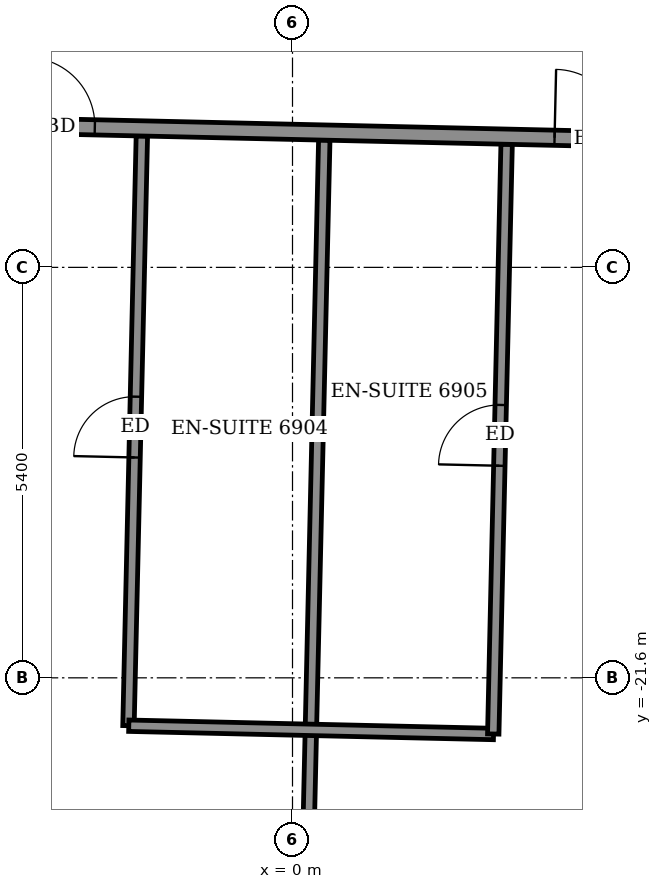
"""IFC4 building model, lengths in metres.
Left out: names, types, materials, properties, quantities, classifications, styles, units other than length and angle.
Written with IfcOpenShell. Run it as: python <this file> out.ifc"""

import sys

from ifc_helpers import new_model, si_unit, direction, frame, frame_2d, origin, place, context, subcontext, project, spatial, rectangle, extrude, element, fill, save


model = new_model("IFC4")
c1 = context("Model", 3, precision=1e-05, world=origin(), true_north=direction((0.0, 1.0)))
c2 = subcontext(c1, "Body", "Model", "MODEL_VIEW")
j1 = project(units=[si_unit("LENGTHUNIT", "METRE"), si_unit("PLANEANGLEUNIT", "RADIAN")], contexts=[c1])
p1 = place(None, origin())
s1 = spatial("IfcSite", under=j1, at=p1, CompositionType="ELEMENT")
p2 = place(p1, origin())
s2 = spatial("IfcBuilding", under=s1, at=p2, CompositionType="ELEMENT")
p3 = place(p2, frame((0.0, 0.0, 271.7)))
s3 = spatial("IfcBuildingStorey", under=s2, at=p3, CompositionType="ELEMENT", Elevation=271.7)
p4 = place(p3, frame((0.143, -26.623, 0.0), z_axis=(0.0, 0.0, 1.0), x_axis=(0.022718655443, 0.999741898039, 0.0)))
e1 = element("IfcWall", 1, at=p4, inside=s3, PredefinedType="PARTITIONING", context=c2, shape_type="SweptSolid", body=[
    extrude(rectangle(XDim=12.1, YDim=0.15, at=frame_2d((6.05, 0.0))), origin(), (0.0, 0.0, 1.0), 2.55),
])
p5 = place(p3, frame((-2.158, -22.23, 0.0), z_axis=(0.0, 0.0, 1.0), x_axis=(0.022683528451, 0.999742695666, 0.0)))
e2 = element("IfcWall", 2, at=p5, inside=s3, PredefinedType="PARTITIONING", context=c2, shape_type="SweptSolid", body=[
    extrude(rectangle(XDim=7.76, YDim=0.15, at=frame_2d((3.88, 0.0))), origin(), (0.0, 0.0, 1.0), 3.05),
])
p6 = place(p5, frame((3.53, 0.0, 0.0)))
e3 = element("IfcOpeningElement", 3, at=p6, cuts=e2, PredefinedType="OPENING", context=c2, shape_type="SweptSolid", body=[
    extrude(rectangle(XDim=0.8, YDim=2.1, at=frame_2d((0.4, 1.05))), frame((0.0, 0.085, 0.0), z_axis=(0.0, -1.0, 0.0), x_axis=(1.0, 0.0, 0.0)), (0.0, 0.0, 1.0), 0.17),
])
p7 = place(p3, frame((-2.154, -22.23, 0.0), z_axis=(0.0, 0.0, 1.0), x_axis=(0.99974154664, -0.022734113616, 0.0)))
e4 = element("IfcWall", 4, at=p7, inside=s3, PredefinedType="PARTITIONING", context=c2, shape_type="SweptSolid", body=[
    extrude(rectangle(XDim=4.8, YDim=0.15, at=frame_2d((2.4, 0.0))), origin(), (0.0, 0.0, 1.0), 3.05),
])
p8 = place(p3, frame((2.641, -22.339, 0.0), z_axis=(0.0, 0.0, 1.0), x_axis=(0.022652083401, 0.999743408639, 0.0)))
e5 = element("IfcWall", 5, at=p8, inside=s3, PredefinedType="PARTITIONING", context=c2, shape_type="SweptSolid", body=[
    extrude(rectangle(XDim=7.76, YDim=0.15, at=frame_2d((3.88, 0.0))), origin(), (0.0, 0.0, 1.0), 3.05),
])
p9 = place(p8, frame((3.53, 0.0, 0.0)))
e6 = element("IfcOpeningElement", 6, at=p9, cuts=e5, PredefinedType="OPENING", context=c2, shape_type="SweptSolid", body=[
    extrude(rectangle(XDim=0.8, YDim=2.1, at=frame_2d((0.4, 1.05))), frame((0.0, 0.085, 0.0), z_axis=(0.0, -1.0, 0.0), x_axis=(1.0, 0.0, 0.0)), (0.0, 0.0, 1.0), 0.17),
])
p10 = place(p3, frame((-25.12, -13.847, 0.0), z_axis=(0.0, 0.0, 1.0), x_axis=(0.999742852445, -0.022676617578, 0.0)))
e7 = element("IfcWall", 7, at=p10, inside=s3, PredefinedType="PARTITIONING", context=c2, shape_type="SweptSolid", body=[
    extrude(rectangle(XDim=52.873, YDim=0.2, at=frame_2d((26.437, 0.0))), origin(), (0.0, 0.0, 1.0), 3.05),
])
p11 = place(p10, frame((2.43, 0.0, 0.0)))
e8 = element("IfcOpeningElement", 8, at=p11, cuts=e7, PredefinedType="OPENING", context=c2, shape_type="SweptSolid", body=[
    extrude(rectangle(XDim=1.0, YDim=2.1, at=frame_2d((0.5, 1.05))), frame((0.0, 0.11, 0.0), z_axis=(0.0, -1.0, 0.0), x_axis=(1.0, 0.0, 0.0)), (0.0, 0.0, 1.0), 0.22),
])
p12 = place(p10, frame((10.325, 0.0, 0.0)))
e9 = element("IfcOpeningElement", 9, at=p12, cuts=e7, PredefinedType="OPENING", context=c2, shape_type="SweptSolid", body=[
    extrude(rectangle(XDim=0.9, YDim=2.1, at=frame_2d((0.45, 1.05))), frame((0.0, 0.11, 0.0), z_axis=(0.0, -1.0, 0.0), x_axis=(1.0, 0.0, 0.0)), (0.0, 0.0, 1.0), 0.22),
])
p13 = place(p10, frame((12.575, 0.0, 0.0)))
e10 = element("IfcOpeningElement", 10, at=p13, cuts=e7, PredefinedType="OPENING", context=c2, shape_type="SweptSolid", body=[
    extrude(rectangle(XDim=0.9, YDim=2.1, at=frame_2d((0.45, 1.05))), frame((0.0, 0.11, 0.0), z_axis=(0.0, -1.0, 0.0), x_axis=(1.0, 0.0, 0.0)), (0.0, 0.0, 1.0), 0.22),
])
p14 = place(p10, frame((19.45, 0.0, 0.0)))
e11 = element("IfcOpeningElement", 11, at=p14, cuts=e7, PredefinedType="OPENING", context=c2, shape_type="SweptSolid", body=[
    extrude(rectangle(XDim=0.9, YDim=2.1, at=frame_2d((0.45, 1.05))), frame((0.0, 0.11, 0.0), z_axis=(0.0, -1.0, 0.0), x_axis=(1.0, 0.0, 0.0)), (0.0, 0.0, 1.0), 0.22),
])
p15 = place(p10, frame((21.625, 0.0, 0.0)))
e12 = element("IfcOpeningElement", 12, at=p15, cuts=e7, PredefinedType="OPENING", context=c2, shape_type="SweptSolid", body=[
    extrude(rectangle(XDim=0.9, YDim=2.1, at=frame_2d((0.45, 1.05))), frame((0.0, 0.11, 0.0), z_axis=(0.0, -1.0, 0.0), x_axis=(1.0, 0.0, 0.0)), (0.0, 0.0, 1.0), 0.22),
])
p16 = place(p10, frame((28.575, 0.0, 0.0)))
e13 = element("IfcOpeningElement", 13, at=p16, cuts=e7, PredefinedType="OPENING", context=c2, shape_type="SweptSolid", body=[
    extrude(rectangle(XDim=0.9, YDim=2.1, at=frame_2d((0.45, 1.05))), frame((0.0, 0.11, 0.0), z_axis=(0.0, -1.0, 0.0), x_axis=(1.0, 0.0, 0.0)), (0.0, 0.0, 1.0), 0.22),
])
p17 = place(p10, frame((30.875, 0.0, 0.0)))
e14 = element("IfcOpeningElement", 14, at=p17, cuts=e7, PredefinedType="OPENING", context=c2, shape_type="SweptSolid", body=[
    extrude(rectangle(XDim=0.9, YDim=2.1, at=frame_2d((0.45, 1.05))), frame((0.0, 0.11, 0.0), z_axis=(0.0, -1.0, 0.0), x_axis=(1.0, 0.0, 0.0)), (0.0, 0.0, 1.0), 0.22),
])
p18 = place(p10, frame((38.175, 0.0, 0.0)))
e15 = element("IfcOpeningElement", 15, at=p18, cuts=e7, PredefinedType="OPENING", context=c2, shape_type="SweptSolid", body=[
    extrude(rectangle(XDim=0.9, YDim=2.1, at=frame_2d((0.45, 1.05))), frame((0.0, 0.11, 0.0), z_axis=(0.0, -1.0, 0.0), x_axis=(1.0, 0.0, 0.0)), (0.0, 0.0, 1.0), 0.22),
])
p19 = place(p10, frame((40.675, 0.0, 0.0)))
e16 = element("IfcOpeningElement", 16, at=p19, cuts=e7, PredefinedType="OPENING", context=c2, shape_type="SweptSolid", body=[
    extrude(rectangle(XDim=0.9, YDim=2.1, at=frame_2d((0.45, 1.05))), frame((0.0, 0.11, 0.0), z_axis=(0.0, -1.0, 0.0), x_axis=(1.0, 0.0, 0.0)), (0.0, 0.0, 1.0), 0.22),
])
p20 = place(p10, frame((50.561, 0.0, 0.0)))
e17 = element("IfcOpeningElement", 17, at=p20, cuts=e7, PredefinedType="OPENING", context=c2, shape_type="SweptSolid", body=[
    extrude(rectangle(XDim=1.0, YDim=2.1, at=frame_2d((0.5, 1.05))), frame((0.0, 0.11, 0.0), z_axis=(0.0, -1.0, 0.0), x_axis=(1.0, 0.0, 0.0)), (0.0, 0.0, 1.0), 0.22),
])
p21 = place(p10, frame((45.6, 0.0, 0.0)))
e18 = element("IfcOpeningElement", 18, at=p21, cuts=e7, PredefinedType="OPENING", context=c2, shape_type="SweptSolid", body=[
    extrude(rectangle(XDim=0.9, YDim=2.1, at=frame_2d((0.45, 1.05))), frame((0.0, 0.11, 0.0), z_axis=(0.0, -1.0, 0.0), x_axis=(1.0, 0.0, 0.0)), (0.0, 0.0, 1.0), 0.22),
])
p22 = place(p15, origin())
e19 = element("IfcDoor", 19, at=p22, inside=s3, OperationType="SINGLE_SWING_RIGHT", PredefinedType="DOOR", context=c2, shape_type="SweptSolid", body=[
    extrude(rectangle(XDim=0.9, YDim=2.1, at=frame_2d((0.45, 1.05))), frame((0.0, 0.025, 0.0), z_axis=(0.0, -1.0, 0.0), x_axis=(1.0, 0.0, 0.0)), (0.0, 0.0, 1.0), 0.05),
])
fill(e12, e19)
p23 = place(p6, origin())
e20 = element("IfcDoor", 20, at=p23, inside=s3, OperationType="SINGLE_SWING_RIGHT", PredefinedType="DOOR", context=c2, shape_type="SweptSolid", body=[
    extrude(rectangle(XDim=0.8, YDim=2.1, at=frame_2d((0.4, 1.05))), frame((0.0, 0.025, 0.0), z_axis=(0.0, -1.0, 0.0), x_axis=(1.0, 0.0, 0.0)), (0.0, 0.0, 1.0), 0.05),
])
fill(e3, e20)
p24 = place(p16, origin())
e21 = element("IfcDoor", 21, at=p24, inside=s3, OperationType="SINGLE_SWING_LEFT", PredefinedType="DOOR", context=c2, shape_type="SweptSolid", body=[
    extrude(rectangle(XDim=0.9, YDim=2.1, at=frame_2d((0.45, 1.05))), frame((0.0, 0.025, 0.0), z_axis=(0.0, -1.0, 0.0), x_axis=(1.0, 0.0, 0.0)), (0.0, 0.0, 1.0), 0.05),
])
fill(e13, e21)
p25 = place(p9, origin())
e22 = element("IfcDoor", 22, at=p25, inside=s3, OperationType="SINGLE_SWING_LEFT", PredefinedType="DOOR", context=c2, shape_type="SweptSolid", body=[
    extrude(rectangle(XDim=0.8, YDim=2.1, at=frame_2d((0.4, 1.05))), frame((0.0, 0.025, 0.0), z_axis=(0.0, -1.0, 0.0), x_axis=(1.0, 0.0, 0.0)), (0.0, 0.0, 1.0), 0.05),
])
fill(e6, e22)
save(model, sys.argv[1])
